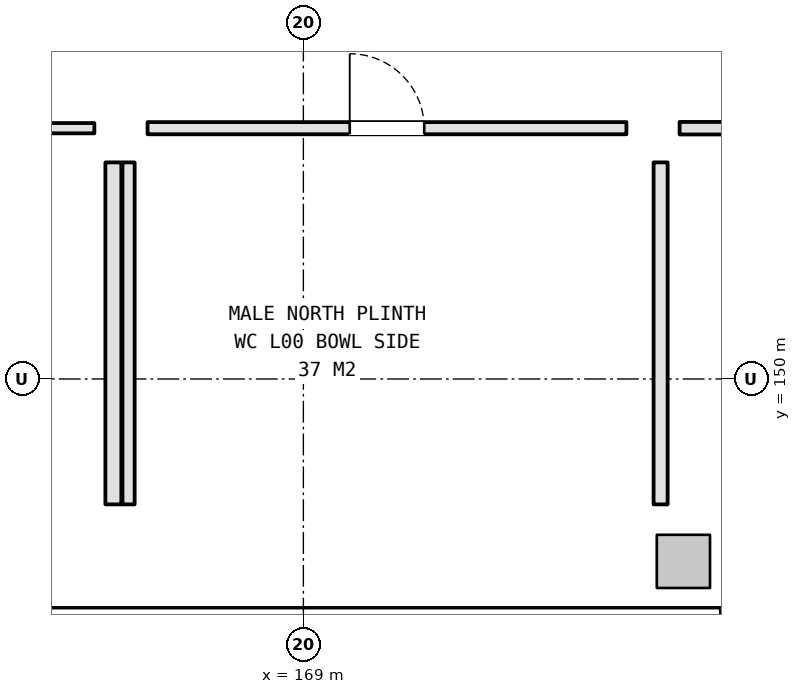
"""IFC4 building model, lengths in metres.
Left out: names, types, materials, properties, quantities, classifications, styles, units other than length and angle.
Written with IfcOpenShell. Run it as: python <this file> out.ifc"""

import sys

from ifc_helpers import new_model, si_unit, direction, frame, frame_2d, origin, origin_2d, place, context, subcontext, project, spatial, rectangle, extrude, element, fill, save


model = new_model("IFC4")
c1 = context("Model", 3, precision=1e-05, world=origin(), true_north=direction((0.0, 1.0)))
c2 = subcontext(c1, "Body", "Model", "MODEL_VIEW")
j1 = project(units=[si_unit("LENGTHUNIT", "METRE"), si_unit("PLANEANGLEUNIT", "RADIAN")], contexts=[c1])
p1 = place(None, origin())
s1 = spatial("IfcSite", under=j1, at=p1, CompositionType="ELEMENT")
p2 = place(p1, origin())
s2 = spatial("IfcBuilding", under=s1, at=p2, CompositionType="ELEMENT")
p3 = place(p2, origin())
s3 = spatial("IfcBuildingStorey", under=s2, at=p3, CompositionType="ELEMENT", Elevation=0.0)
p4 = place(p3, frame((174.0, 147.6, 0.0), z_axis=(0.0, 0.0, 1.0), x_axis=(1.0, 0.0, 0.0)))
e1 = element("IfcColumn", 1, at=p4, inside=s3, PredefinedType="COLUMN", context=c2, shape_type="SweptSolid", body=[
    extrude(rectangle(XDim=0.7, YDim=0.7, at=origin_2d()), origin(), (0.0, 0.0, 1.0), 5.4),
])
p5 = place(p3, frame((147.49, 153.3, 0.0), z_axis=(0.0, 0.0, 1.0), x_axis=(1.0, 0.0, 0.0)))
e2 = element("IfcWall", 2, at=p5, inside=s3, PredefinedType="PARTITIONING", context=c2, shape_type="SweptSolid", body=[
    extrude(rectangle(XDim=18.76, YDim=0.135, at=frame_2d((9.38, 0.0))), origin(), (0.0, 0.0, 1.0), 4.525),
])
p6 = place(p5, frame((8.855, 0.0, 0.0)))
e3 = element("IfcOpeningElement", 3, at=p6, cuts=e2, PredefinedType="OPENING", context=c2, shape_type="SweptSolid", body=[
    extrude(rectangle(XDim=1.05, YDim=2.2, at=frame_2d((0.525, 1.1))), frame((0.0, 0.077, 0.0), z_axis=(0.0, -1.0, 0.0), x_axis=(1.0, 0.0, 0.0)), (0.0, 0.0, 1.0), 0.155),
])
p7 = place(p3, frame((166.5, 152.85, 0.0), z_axis=(0.0, 0.0, 1.0), x_axis=(0.0, -1.0, 0.0)))
e4 = element("IfcWall", 4, at=p7, inside=s3, PredefinedType="PLUMBINGWALL", context=c2, shape_type="SweptSolid", body=[
    extrude(rectangle(XDim=4.5, YDim=0.21, at=frame_2d((2.25, 0.0))), origin(), (0.0, 0.0, 1.0), 4.675),
])
p8 = place(p3, frame((166.95, 153.3, 0.0), z_axis=(0.0, 0.0, 1.0), x_axis=(1.0, 0.0, 0.0)))
e5 = element("IfcWall", 5, at=p8, inside=s3, PredefinedType="PARTITIONING", context=c2, shape_type="SweptSolid", body=[
    extrude(rectangle(XDim=6.3, YDim=0.16, at=frame_2d((3.15, 0.0))), origin(), (0.0, 0.0, 1.0), 5.12),
])
p9 = place(p8, frame((2.66, 0.0, 0.0)))
e6 = element("IfcOpeningElement", 6, at=p9, cuts=e5, PredefinedType="OPENING", context=c2, shape_type="SweptSolid", body=[
    extrude(rectangle(XDim=0.98, YDim=2.15, at=frame_2d((0.49, 1.075))), frame((0.0, 0.09, 0.0), z_axis=(0.0, -1.0, 0.0), x_axis=(1.0, 0.0, 0.0)), (0.0, 0.0, 1.0), 0.18),
])
p10 = place(p3, frame((166.7, 148.35, 0.0), z_axis=(0.0, 0.0, 1.0), x_axis=(0.0, 1.0, 0.0)))
e7 = element("IfcWall", 7, at=p10, inside=s3, PredefinedType="PARTITIONING", context=c2, shape_type="SweptSolid", body=[
    extrude(rectangle(XDim=4.5, YDim=0.16, at=frame_2d((2.25, 0.0))), origin(), (0.0, 0.0, 1.0), 4.675),
])
p11 = place(p3, frame((173.95, 153.3, 0.0), z_axis=(0.0, 0.0, 1.0), x_axis=(1.0, 0.0, 0.0)))
e8 = element("IfcWall", 8, at=p11, inside=s3, PredefinedType="PARTITIONING", context=c2, shape_type="SweptSolid", body=[
    extrude(rectangle(XDim=6.3, YDim=0.165, at=frame_2d((3.15, 0.0))), origin(), (0.0, 0.0, 1.0), 4.525),
])
p12 = place(p11, frame((2.59, 0.0, 0.0)))
e9 = element("IfcOpeningElement", 9, at=p12, cuts=e8, PredefinedType="OPENING", context=c2, shape_type="SweptSolid", body=[
    extrude(rectangle(XDim=1.12, YDim=2.2, at=frame_2d((0.56, 1.1))), frame((0.0, 0.093, 0.0), z_axis=(0.0, -1.0, 0.0), x_axis=(1.0, 0.0, 0.0)), (0.0, 0.0, 1.0), 0.185),
])
p13 = place(p3, frame((173.7, 148.35, 0.0), z_axis=(0.0, 0.0, 1.0), x_axis=(0.0, 1.0, 0.0)))
e10 = element("IfcWall", 10, at=p13, inside=s3, PredefinedType="PARTITIONING", context=c2, shape_type="SweptSolid", body=[
    extrude(rectangle(XDim=4.5, YDim=0.185, at=frame_2d((2.25, 0.0))), origin(), (0.0, 0.0, 1.0), 4.525),
])
p14 = place(p9, origin())
e11 = element("IfcDoor", 11, at=p14, inside=s3, OperationType="SINGLE_SWING_LEFT", PredefinedType="DOOR", context=c2, shape_type="SweptSolid", body=[
    extrude(rectangle(XDim=0.98, YDim=2.15, at=frame_2d((0.49, 1.075))), frame((0.0, 0.025, 0.0), z_axis=(0.0, -1.0, 0.0), x_axis=(1.0, 0.0, 0.0)), (0.0, 0.0, 1.0), 0.05),
])
fill(e6, e11)
save(model, sys.argv[1])
